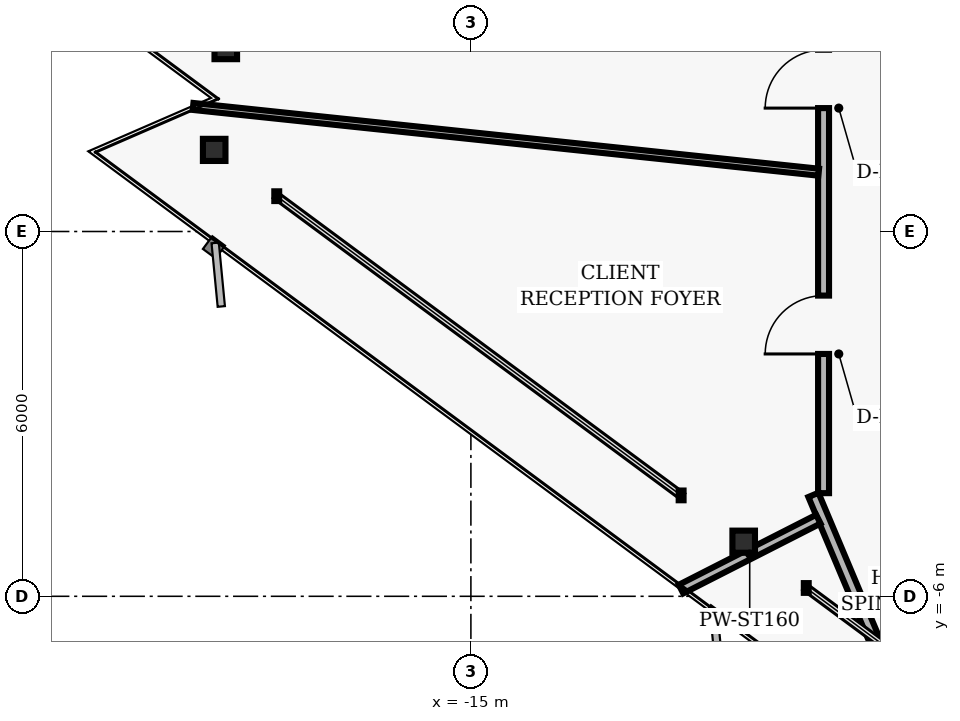
"""IFC4 building model, lengths in metres.
Left out: names, types, materials, properties, quantities, classifications, styles, units other than length and angle.
Written with IfcOpenShell. Run it as: python <this file> out.ifc"""

import sys

from ifc_helpers import new_model, si_unit, direction, frame, frame_2d, origin, origin_2d, place, context, subcontext, project, spatial, rectangle, i_section, extrude, element, fill, save


model = new_model("IFC4")
c1 = context("Model", 3, precision=1e-05, world=origin(), true_north=direction((0.0, 1.0)))
c2 = subcontext(c1, "Body", "Model", "MODEL_VIEW")
j1 = project(units=[si_unit("LENGTHUNIT", "METRE"), si_unit("PLANEANGLEUNIT", "RADIAN")], contexts=[c1])
p1 = place(None, origin())
s1 = spatial("IfcSite", under=j1, at=p1, CompositionType="ELEMENT")
p2 = place(p1, origin())
s2 = spatial("IfcBuilding", under=s1, at=p2, CompositionType="ELEMENT")
p3 = place(p2, frame((0.0, 0.0, 227.04)))
s3 = spatial("IfcBuildingStorey", under=s2, at=p3, CompositionType="ELEMENT", Elevation=227.04)
for number, where, z_axis, x_axis in (
    (1, (-19.031, 3.016, 0.0), (0.0, 0.0, 1.0), (1.0, 0.0, 0.0)),
    (2, (-19.222, 1.342, 0.0), (0.0, 0.0, 1.0), (1.0, 0.0, 0.0)),
    (3, (-10.513, -5.102, 0.0), (0.0, 0.0, 1.0), (1.0, 0.0, 0.0)),
):
    element("IfcColumn", number, at=place(p3, frame(where, z_axis=z_axis, x_axis=x_axis)), inside=s3, PredefinedType="COLUMN", context=c2, shape_type="SweptSolid", body=[
        extrude(i_section(OverallWidth=0.371, OverallDepth=0.364, WebThickness=0.013, FlangeThickness=0.022, FilletRadius=0.015, at=origin_2d()), origin(), (0.0, 0.0, 1.0), 3.04),
    ])
p4 = place(p3, frame((-7.574, -8.596, 0.0), z_axis=(0.0, 0.0, 1.0), x_axis=(-0.38757793583, 0.921836939842, 0.0)))
e4 = element("IfcWall", 4, at=p4, inside=s3, PredefinedType="PARTITIONING", context=c2, shape_type="SweptSolid", body=[
    extrude(rectangle(XDim=4.625, YDim=0.18, at=frame_2d((2.313, 0.0))), origin(), (0.0, 0.0, 1.0), 2.773),
])
p5 = place(p3, frame((-9.2, -4.303, 0.0), z_axis=(0.0, 0.0, 1.0), x_axis=(0.0, 1.0, 0.0)))
e5 = element("IfcWall", 5, at=p5, inside=s3, PredefinedType="PARTITIONING", context=c2, shape_type="SweptSolid", body=[
    extrude(rectangle(XDim=8.607, YDim=0.18, at=frame_2d((4.303, 0.0))), origin(), (0.0, 0.0, 1.0), 2.773),
])
p6 = place(p5, frame((2.289, 0.0, 0.0)))
e6 = element("IfcOpeningElement", 6, at=p6, cuts=e5, PredefinedType="OPENING", context=c2, shape_type="SweptSolid", body=[
    extrude(rectangle(XDim=0.96, YDim=2.02, at=frame_2d((0.48, 1.01))), frame((0.0, 0.1, 0.0), z_axis=(0.0, -1.0, 0.0), x_axis=(1.0, 0.0, 0.0)), (0.0, 0.0, 1.0), 0.2),
])
p7 = place(p5, frame((6.333, 0.0, 0.0)))
e7 = element("IfcOpeningElement", 7, at=p7, cuts=e5, PredefinedType="OPENING", context=c2, shape_type="SweptSolid", body=[
    extrude(rectangle(XDim=0.96, YDim=2.02, at=frame_2d((0.48, 1.01))), frame((0.0, 0.1, 0.0), z_axis=(0.0, -1.0, 0.0), x_axis=(1.0, 0.0, 0.0)), (0.0, 0.0, 1.0), 0.2),
])
p8 = place(p3, frame((-9.286, -4.731, 0.0), z_axis=(0.0, 0.0, 1.0), x_axis=(-0.890990970919, -0.454021023456, 0.0)))
e8 = element("IfcWall", 8, at=p8, inside=s3, PredefinedType="PARTITIONING", context=c2, shape_type="SweptSolid", body=[
    extrude(rectangle(XDim=2.534, YDim=0.16, at=frame_2d((1.267, 0.0))), origin(), (0.0, 0.0, 1.0), 2.773),
])
p9 = place(p3, frame((-9.28, 0.975, 0.0), z_axis=(0.0, 0.0, 1.0), x_axis=(-0.994520958229, 0.104537379166, 0.0)))
e9 = element("IfcWall", 9, at=p9, inside=s3, PredefinedType="MOVABLE", context=c2, shape_type="SweptSolid", body=[
    extrude(rectangle(XDim=10.346, YDim=0.115, at=frame_2d((5.173, 0.0))), origin(), (0.0, 0.0, 1.0), 2.773),
])
p10 = place(p6, origin())
e10 = element("IfcDoor", 10, at=p10, inside=s3, OperationType="SINGLE_SWING_LEFT", PredefinedType="DOOR", context=c2, shape_type="SweptSolid", body=[
    extrude(rectangle(XDim=0.96, YDim=2.02, at=frame_2d((0.48, 1.01))), frame((0.0, 0.025, 0.0), z_axis=(0.0, -1.0, 0.0), x_axis=(1.0, 0.0, 0.0)), (0.0, 0.0, 1.0), 0.05),
])
fill(e6, e10)
p11 = place(p7, origin())
e11 = element("IfcDoor", 11, at=p11, inside=s3, OperationType="SINGLE_SWING_LEFT", PredefinedType="DOOR", context=c2, shape_type="SweptSolid", body=[
    extrude(rectangle(XDim=0.96, YDim=2.02, at=frame_2d((0.48, 1.01))), frame((0.0, 0.025, 0.0), z_axis=(0.0, -1.0, 0.0), x_axis=(1.0, 0.0, 0.0)), (0.0, 0.0, 1.0), 0.05),
])
fill(e7, e11)
save(model, sys.argv[1])
